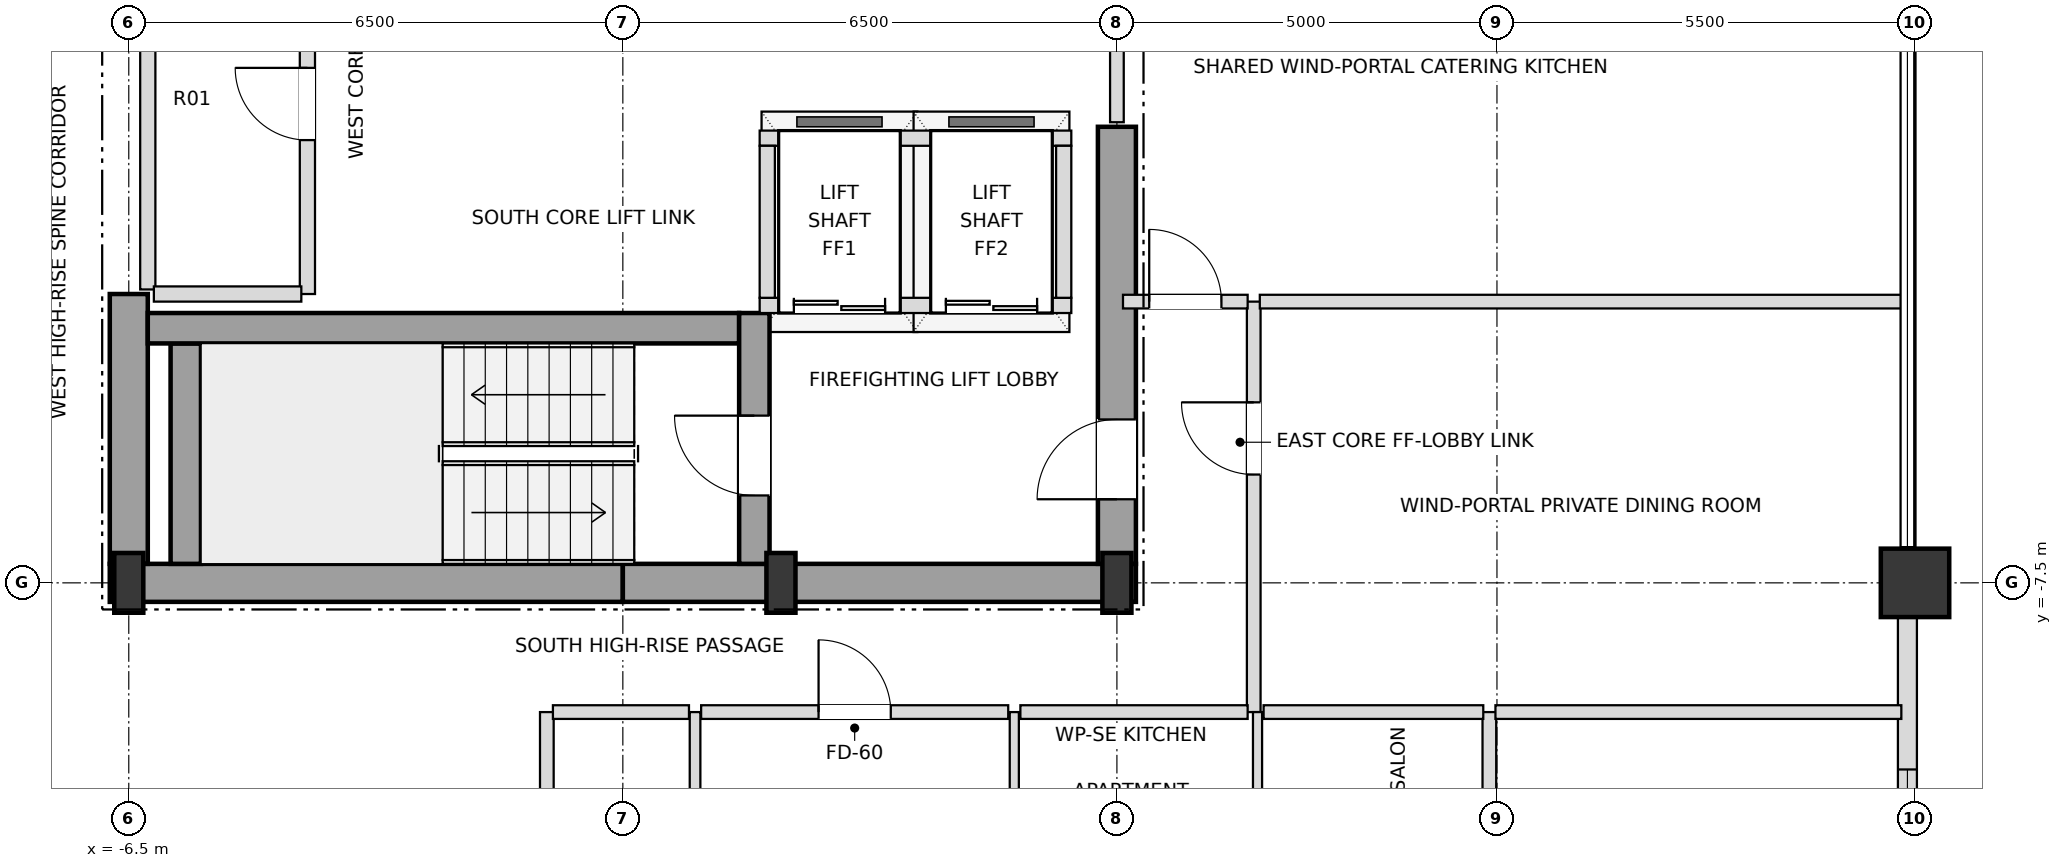
"""IFC4 building model, lengths in metres.
Left out: names, types, materials, properties, quantities, classifications, styles, units other than length and angle.
Written with IfcOpenShell. Run it as: python <this file> out.ifc"""

import sys

from ifc_helpers import new_model, si_unit, direction, frame, frame_2d, origin, origin_2d, place, context, subcontext, project, spatial, rectangle, i_section, extrude, element, fill, save


model = new_model("IFC4")
c1 = context("Model", 3, precision=1e-05, world=origin(), true_north=direction((0.0, 1.0)))
c2 = subcontext(c1, "Body", "Model", "MODEL_VIEW")
j1 = project(units=[si_unit("LENGTHUNIT", "METRE"), si_unit("PLANEANGLEUNIT", "RADIAN")], contexts=[c1])
p1 = place(None, origin())
s1 = spatial("IfcSite", under=j1, at=p1, CompositionType="ELEMENT")
p2 = place(p1, origin())
s2 = spatial("IfcBuilding", under=s1, at=p2, CompositionType="ELEMENT")
p3 = place(p2, frame((0.0, 0.0, 261.9)))
s3 = spatial("IfcBuildingStorey", under=s2, at=p3, CompositionType="ELEMENT", Elevation=261.9)
for number, where, z_axis, x_axis in (
    (1, (-6.5, -7.5, 0.0), (0.0, 0.0, 1.0), (1.0, 0.0, 0.0)),
    (2, (2.08, -7.5, 0.0), (0.0, 0.0, 1.0), (1.0, 0.0, 0.0)),
    (3, (6.5, -7.5, 0.0), (0.0, 0.0, 1.0), (1.0, 0.0, 0.0)),
):
    element("IfcColumn", number, at=place(p3, frame(where, z_axis=z_axis, x_axis=x_axis)), inside=s3, PredefinedType="COLUMN", context=c2, shape_type="SweptSolid", body=[
        extrude(i_section(OverallWidth=0.382, OverallDepth=0.786, WebThickness=0.02, FlangeThickness=0.033, at=origin_2d()), origin(), (0.0, 0.0, 1.0), 3.6),
    ])
p4 = place(p3, frame((17.0, -7.5, 0.0), z_axis=(0.0, 0.0, 1.0), x_axis=(1.0, 0.0, 0.0)))
e4 = element("IfcColumn", 4, at=p4, inside=s3, PredefinedType="USERDEFINED", context=c2, shape_type="SweptSolid", body=[
    extrude(rectangle(XDim=0.9, YDim=0.9, at=origin_2d()), origin(), (0.0, 0.0, 1.0), 3.6),
])
p5 = place(p3, frame((16.9, -12.555, 0.0), z_axis=(0.0, 0.0, 1.0), x_axis=(0.0, 1.0, 0.0)))
e5 = element("IfcWall", 5, at=p5, inside=s3, PredefinedType="SOLIDWALL", context=c2, shape_type="SweptSolid", body=[
    extrude(rectangle(XDim=4.61, YDim=0.25, at=frame_2d((2.305, 0.0))), origin(), (0.0, 0.0, 1.0), 2.748),
])
p6 = place(p5, frame((0.8, 0.0, 0.72)))
e6 = element("IfcOpeningElement", 6, at=p6, cuts=e5, PredefinedType="OPENING", context=c2, shape_type="SweptSolid", body=[
    extrude(rectangle(XDim=1.8, YDim=1.68, at=frame_2d((0.9, 0.84))), frame((0.0, 0.135, 0.0), z_axis=(0.0, -1.0, 0.0), x_axis=(1.0, 0.0, 0.0)), (0.0, 0.0, 1.0), 0.27),
])
for number, where, z_axis, x_axis in (
    (7, (-6.75, -7.5, 0.0), (0.0, 0.0, 1.0), (1.0, 0.0, 0.0)),
    (8, (0.0, -7.5, 0.0), (0.0, 0.0, 1.0), (1.0, 0.0, 0.0)),
):
    element("IfcWall", number, at=place(p3, frame(where, z_axis=z_axis, x_axis=x_axis)), inside=s3, PredefinedType="SHEAR", context=c2, shape_type="SweptSolid", body=[
        extrude(rectangle(XDim=6.75, YDim=0.5, at=frame_2d((3.375, 0.0))), origin(), (0.0, 0.0, 1.0), 3.38),
    ])
p7 = place(p3, frame((-6.5, -7.25, 0.0), z_axis=(0.0, 0.0, 1.0), x_axis=(0.0, 1.0, 0.0)))
e9 = element("IfcWall", 9, at=p7, inside=s3, PredefinedType="SHEAR", context=c2, shape_type="SweptSolid", body=[
    extrude(rectangle(XDim=3.55, YDim=0.5, at=frame_2d((1.775, 0.0))), origin(), (0.0, 0.0, 1.0), 3.38),
])
p8 = place(p3, frame((6.5, -7.25, 0.0), z_axis=(0.0, 0.0, 1.0), x_axis=(0.0, 1.0, 0.0)))
e10 = element("IfcWall", 10, at=p8, inside=s3, PredefinedType="SHEAR", context=c2, shape_type="SweptSolid", body=[
    extrude(rectangle(XDim=5.75, YDim=0.5, at=frame_2d((2.875, 0.0))), origin(), (0.0, 0.0, 1.0), 3.38),
])
p9 = place(p8, frame((0.85, 0.0, 0.0)))
e11 = element("IfcOpeningElement", 11, at=p9, cuts=e10, PredefinedType="OPENING", context=c2, shape_type="SweptSolid", body=[
    extrude(rectangle(XDim=1.05, YDim=2.15, at=frame_2d((0.525, 1.075))), frame((0.0, 0.26, 0.0), z_axis=(0.0, -1.0, 0.0), x_axis=(1.0, 0.0, 0.0)), (0.0, 0.0, 1.0), 0.52),
])
p10 = place(p3, frame((-5.75, -7.25, 0.0), z_axis=(0.0, 0.0, 1.0), x_axis=(0.0, 1.0, 0.0)))
e12 = element("IfcWall", 12, at=p10, inside=s3, PredefinedType="SHEAR", context=c2, shape_type="SweptSolid", body=[
    extrude(rectangle(XDim=2.9, YDim=0.4, at=frame_2d((1.45, 0.0))), origin(), (0.0, 0.0, 1.0), 3.38),
])
p11 = place(p3, frame((-6.25, -4.15, 0.0), z_axis=(0.0, 0.0, 1.0), x_axis=(1.0, 0.0, 0.0)))
e13 = element("IfcWall", 13, at=p11, inside=s3, PredefinedType="SHEAR", context=c2, shape_type="SweptSolid", body=[
    extrude(rectangle(XDim=7.78, YDim=0.4, at=frame_2d((3.89, 0.0))), origin(), (0.0, 0.0, 1.0), 3.38),
])
p12 = place(p3, frame((1.73, -7.25, 0.0), z_axis=(0.0, 0.0, 1.0), x_axis=(0.0, 1.0, 0.0)))
e14 = element("IfcWall", 14, at=p12, inside=s3, PredefinedType="SHEAR", context=c2, shape_type="SweptSolid", body=[
    extrude(rectangle(XDim=3.3, YDim=0.4, at=frame_2d((1.65, 0.0))), origin(), (0.0, 0.0, 1.0), 3.38),
])
p13 = place(p12, frame((0.9, 0.0, 0.0)))
e15 = element("IfcOpeningElement", 15, at=p13, cuts=e14, PredefinedType="OPENING", context=c2, shape_type="SweptSolid", body=[
    extrude(rectangle(XDim=1.05, YDim=2.15, at=frame_2d((0.525, 1.075))), frame((0.0, 0.21, 0.0), z_axis=(0.0, -1.0, 0.0), x_axis=(1.0, 0.0, 0.0)), (0.0, 0.0, 1.0), 0.42),
])
p14 = place(p3, frame((1.8, -3.85, 0.0), z_axis=(0.0, 0.0, 1.0), x_axis=(1.0, 0.0, 0.0)))
e16 = element("IfcWall", 16, at=p14, inside=s3, PredefinedType="SOLIDWALL", context=c2, shape_type="SweptSolid", body=[
    extrude(rectangle(XDim=4.1, YDim=0.2, at=frame_2d((2.05, 0.0))), origin(), (0.0, 0.0, 1.0), 3.38),
])
p15 = place(p14, frame((0.45, 0.0, 0.0)))
e17 = element("IfcOpeningElement", 17, at=p15, cuts=e16, PredefinedType="OPENING", context=c2, shape_type="SweptSolid", body=[
    extrude(rectangle(XDim=1.2, YDim=2.2, at=frame_2d((0.6, 1.1))), frame((0.0, 0.11, 0.0), z_axis=(0.0, -1.0, 0.0), x_axis=(1.0, 0.0, 0.0)), (0.0, 0.0, 1.0), 0.22),
])
p16 = place(p14, frame((2.45, 0.0, 0.0)))
e18 = element("IfcOpeningElement", 18, at=p16, cuts=e16, PredefinedType="OPENING", context=c2, shape_type="SweptSolid", body=[
    extrude(rectangle(XDim=1.2, YDim=2.2, at=frame_2d((0.6, 1.1))), frame((0.0, 0.11, 0.0), z_axis=(0.0, -1.0, 0.0), x_axis=(1.0, 0.0, 0.0)), (0.0, 0.0, 1.0), 0.22),
])
p17 = place(p3, frame((1.8, -1.65, 0.0), z_axis=(0.0, 0.0, 1.0), x_axis=(1.0, 0.0, 0.0)))
e19 = element("IfcWall", 19, at=p17, inside=s3, PredefinedType="SOLIDWALL", context=c2, shape_type="SweptSolid", body=[
    extrude(rectangle(XDim=4.1, YDim=0.2, at=frame_2d((2.05, 0.0))), origin(), (0.0, 0.0, 1.0), 3.38),
])
for number, where, z_axis, x_axis in (
    (20, (1.9, -3.75, 0.0), (0.0, 0.0, 1.0), (0.0, 1.0, 0.0)),
    (21, (5.8, -3.75, 0.0), (0.0, 0.0, 1.0), (0.0, 1.0, 0.0)),
):
    element("IfcWall", number, at=place(p3, frame(where, z_axis=z_axis, x_axis=x_axis)), inside=s3, PredefinedType="SOLIDWALL", context=c2, shape_type="SweptSolid", body=[
        extrude(rectangle(XDim=2.0, YDim=0.2, at=frame_2d((1.0, 0.0))), origin(), (0.0, 0.0, 1.0), 3.38),
    ])
p18 = place(p3, frame((-6.25, -3.64, 0.0), z_axis=(0.0, 0.0, 1.0), x_axis=(0.0, 1.0, 0.0)))
e22 = element("IfcWall", 22, at=p18, inside=s3, PredefinedType="SOLIDWALL", context=c2, shape_type="SweptSolid", body=[
    extrude(rectangle(XDim=7.34, YDim=0.2, at=frame_2d((3.67, 0.0))), origin(), (0.0, 0.0, 1.0), 3.38),
])
p19 = place(p3, frame((-4.15, -3.7, 0.0), z_axis=(0.0, 0.0, 1.0), x_axis=(0.0, 1.0, 0.0)))
e23 = element("IfcWall", 23, at=p19, inside=s3, PredefinedType="SOLIDWALL", context=c2, shape_type="SweptSolid", body=[
    extrude(rectangle(XDim=7.4, YDim=0.2, at=frame_2d((3.7, 0.0))), origin(), (0.0, 0.0, 1.0), 3.38),
])
p20 = place(p19, frame((2.025, 0.0, 0.0)))
e24 = element("IfcOpeningElement", 24, at=p20, cuts=e23, PredefinedType="OPENING", context=c2, shape_type="SweptSolid", body=[
    extrude(rectangle(XDim=0.95, YDim=2.15, at=frame_2d((0.475, 1.075))), frame((0.0, 0.11, 0.0), z_axis=(0.0, -1.0, 0.0), x_axis=(1.0, 0.0, 0.0)), (0.0, 0.0, 1.0), 0.22),
])
p21 = place(p19, frame((5.775, 0.0, 0.0)))
e25 = element("IfcOpeningElement", 25, at=p21, cuts=e23, PredefinedType="OPENING", context=c2, shape_type="SweptSolid", body=[
    extrude(rectangle(XDim=0.95, YDim=2.15, at=frame_2d((0.475, 1.075))), frame((0.0, 0.11, 0.0), z_axis=(0.0, -1.0, 0.0), x_axis=(1.0, 0.0, 0.0)), (0.0, 0.0, 1.0), 0.22),
])
p22 = place(p3, frame((-1.0, -19.9, 0.0), z_axis=(0.0, 0.0, 1.0), x_axis=(0.0, 1.0, 0.0)))
e26 = element("IfcWall", 26, at=p22, inside=s3, PredefinedType="PARTITIONING", context=c2, shape_type="SweptSolid", body=[
    extrude(rectangle(XDim=10.7, YDim=0.18, at=frame_2d((5.35, 0.0))), origin(), (0.0, 0.0, 1.0), 3.018),
])
p23 = place(p3, frame((0.95, -13.9, 0.0), z_axis=(0.0, 0.0, 1.0), x_axis=(0.0, 1.0, 0.0)))
e27 = element("IfcWall", 27, at=p23, inside=s3, PredefinedType="PARTITIONING", context=c2, shape_type="SweptSolid", body=[
    extrude(rectangle(XDim=4.7, YDim=0.14, at=frame_2d((2.35, 0.0))), origin(), (0.0, 0.0, 1.0), 3.38),
])
p24 = place(p23, frame((1.9, 0.0, 0.0)))
e28 = element("IfcOpeningElement", 28, at=p24, cuts=e27, PredefinedType="OPENING", context=c2, shape_type="SweptSolid", body=[
    extrude(rectangle(XDim=0.9, YDim=2.1, at=frame_2d((0.45, 1.05))), frame((0.0, 0.08, 0.0), z_axis=(0.0, -1.0, 0.0), x_axis=(1.0, 0.0, 0.0)), (0.0, 0.0, 1.0), 0.16),
])
p25 = place(p3, frame((5.15, -13.9, 0.0), z_axis=(0.0, 0.0, 1.0), x_axis=(0.0, 1.0, 0.0)))
e29 = element("IfcWall", 29, at=p25, inside=s3, PredefinedType="PARTITIONING", context=c2, shape_type="SweptSolid", body=[
    extrude(rectangle(XDim=4.7, YDim=0.12, at=frame_2d((2.35, 0.0))), origin(), (0.0, 0.0, 1.0), 3.38),
])
p26 = place(p25, frame((1.875, 0.0, 0.0)))
e30 = element("IfcOpeningElement", 30, at=p26, cuts=e29, PredefinedType="OPENING", context=c2, shape_type="SweptSolid", body=[
    extrude(rectangle(XDim=0.95, YDim=2.1, at=frame_2d((0.475, 1.05))), frame((0.0, 0.07, 0.0), z_axis=(0.0, -1.0, 0.0), x_axis=(1.0, 0.0, 0.0)), (0.0, 0.0, 1.0), 0.14),
])
p27 = place(p3, frame((6.5, -1.44, 0.0), z_axis=(0.0, 0.0, 1.0), x_axis=(0.0, 1.0, 0.0)))
e31 = element("IfcWall", 31, at=p27, inside=s3, PredefinedType="PARTITIONING", context=c2, shape_type="SweptSolid", body=[
    extrude(rectangle(XDim=5.33, YDim=0.18, at=frame_2d((2.665, 0.0))), origin(), (0.0, 0.0, 1.0), 2.826),
])
p28 = place(p3, frame((8.3, -9.2, 0.0), z_axis=(0.0, 0.0, 1.0), x_axis=(0.0, 1.0, 0.0)))
e32 = element("IfcWall", 32, at=p28, inside=s3, PredefinedType="PARTITIONING", context=c2, shape_type="SweptSolid", body=[
    extrude(rectangle(XDim=5.4, YDim=0.18, at=frame_2d((2.7, 0.0))), origin(), (0.0, 0.0, 1.0), 2.826),
])
p29 = place(p28, frame((3.125, 0.0, 0.0)))
e33 = element("IfcOpeningElement", 33, at=p29, cuts=e32, PredefinedType="OPENING", context=c2, shape_type="SweptSolid", body=[
    extrude(rectangle(XDim=0.95, YDim=2.15, at=frame_2d((0.475, 1.075))), frame((0.0, 0.1, 0.0), z_axis=(0.0, -1.0, 0.0), x_axis=(1.0, 0.0, 0.0)), (0.0, 0.0, 1.0), 0.2),
])
p30 = place(p3, frame((8.35, -19.9, 0.0), z_axis=(0.0, 0.0, 1.0), x_axis=(0.0, 1.0, 0.0)))
e34 = element("IfcWall", 34, at=p30, inside=s3, PredefinedType="PARTITIONING", context=c2, shape_type="SweptSolid", body=[
    extrude(rectangle(XDim=10.7, YDim=0.12, at=frame_2d((5.35, 0.0))), origin(), (0.0, 0.0, 1.0), 2.826),
])
p31 = place(p30, frame((7.875, 0.0, 0.0)))
e35 = element("IfcOpeningElement", 35, at=p31, cuts=e34, PredefinedType="OPENING", context=c2, shape_type="SweptSolid", body=[
    extrude(rectangle(XDim=0.95, YDim=2.1, at=frame_2d((0.475, 1.05))), frame((0.0, 0.07, 0.0), z_axis=(0.0, -1.0, 0.0), x_axis=(1.0, 0.0, 0.0)), (0.0, 0.0, 1.0), 0.14),
])
p32 = place(p30, frame((2.55, 0.0, 0.0)))
e36 = element("IfcOpeningElement", 36, at=p32, cuts=e34, PredefinedType="OPENING", context=c2, shape_type="SweptSolid", body=[
    extrude(rectangle(XDim=0.9, YDim=2.1, at=frame_2d((0.45, 1.05))), frame((0.0, 0.07, 0.0), z_axis=(0.0, -1.0, 0.0), x_axis=(1.0, 0.0, 0.0)), (0.0, 0.0, 1.0), 0.14),
])
p33 = place(p3, frame((11.4, -14.27, 0.0), z_axis=(0.0, 0.0, 1.0), x_axis=(0.0, 1.0, 0.0)))
e37 = element("IfcWall", 37, at=p33, inside=s3, PredefinedType="PARTITIONING", context=c2, shape_type="SweptSolid", body=[
    extrude(rectangle(XDim=5.07, YDim=0.18, at=frame_2d((2.535, 0.0))), origin(), (0.0, 0.0, 1.0), 2.748),
])
p34 = place(p3, frame((-0.92, -9.2, 0.0), z_axis=(0.0, 0.0, 1.0), x_axis=(1.0, 0.0, 0.0)))
e38 = element("IfcWall", 38, at=p34, inside=s3, PredefinedType="PARTITIONING", context=c2, shape_type="SweptSolid", body=[
    extrude(rectangle(XDim=1.79, YDim=0.18, at=frame_2d((0.895, 0.0))), origin(), (0.0, 0.0, 1.0), 3.38),
])
p35 = place(p3, frame((1.03, -9.2, 0.0), z_axis=(0.0, 0.0, 1.0), x_axis=(1.0, 0.0, 0.0)))
e39 = element("IfcWall", 39, at=p35, inside=s3, PredefinedType="PARTITIONING", context=c2, shape_type="SweptSolid", body=[
    extrude(rectangle(XDim=4.04, YDim=0.18, at=frame_2d((2.02, 0.0))), origin(), (0.0, 0.0, 1.0), 3.38),
])
p36 = place(p35, frame((1.545, 0.0, 0.0)))
e40 = element("IfcOpeningElement", 40, at=p36, cuts=e39, PredefinedType="OPENING", context=c2, shape_type="SweptSolid", body=[
    extrude(rectangle(XDim=0.95, YDim=2.15, at=frame_2d((0.475, 1.075))), frame((0.0, 0.1, 0.0), z_axis=(0.0, -1.0, 0.0), x_axis=(1.0, 0.0, 0.0)), (0.0, 0.0, 1.0), 0.2),
])
p37 = place(p3, frame((5.23, -9.2, 0.0), z_axis=(0.0, 0.0, 1.0), x_axis=(1.0, 0.0, 0.0)))
e41 = element("IfcWall", 41, at=p37, inside=s3, PredefinedType="PARTITIONING", context=c2, shape_type="SweptSolid", body=[
    extrude(rectangle(XDim=2.99, YDim=0.18, at=frame_2d((1.495, 0.0))), origin(), (0.0, 0.0, 1.0), 2.826),
])
p38 = place(p3, frame((8.43, -9.2, 0.0), z_axis=(0.0, 0.0, 1.0), x_axis=(1.0, 0.0, 0.0)))
e42 = element("IfcWall", 42, at=p38, inside=s3, PredefinedType="PARTITIONING", context=c2, shape_type="SweptSolid", body=[
    extrude(rectangle(XDim=2.89, YDim=0.18, at=frame_2d((1.445, 0.0))), origin(), (0.0, 0.0, 1.0), 3.38),
])
p39 = place(p3, frame((11.48, -9.2, 0.0), z_axis=(0.0, 0.0, 1.0), x_axis=(1.0, 0.0, 0.0)))
e43 = element("IfcWall", 43, at=p39, inside=s3, PredefinedType="PARTITIONING", context=c2, shape_type="SweptSolid", body=[
    extrude(rectangle(XDim=5.34, YDim=0.18, at=frame_2d((2.67, 0.0))), origin(), (0.0, 0.0, 1.0), 3.38),
])
p40 = place(p3, frame((6.58, -3.8, 0.0), z_axis=(0.0, 0.0, 1.0), x_axis=(1.0, 0.0, 0.0)))
e44 = element("IfcWall", 44, at=p40, inside=s3, PredefinedType="PARTITIONING", context=c2, shape_type="SweptSolid", body=[
    extrude(rectangle(XDim=1.64, YDim=0.18, at=frame_2d((0.82, 0.0))), origin(), (0.0, 0.0, 1.0), 3.38),
])
p41 = place(p40, frame((0.345, 0.0, 0.0)))
e45 = element("IfcOpeningElement", 45, at=p41, cuts=e44, PredefinedType="OPENING", context=c2, shape_type="SweptSolid", body=[
    extrude(rectangle(XDim=0.95, YDim=2.15, at=frame_2d((0.475, 1.075))), frame((0.0, 0.1, 0.0), z_axis=(0.0, -1.0, 0.0), x_axis=(1.0, 0.0, 0.0)), (0.0, 0.0, 1.0), 0.2),
])
p42 = place(p3, frame((8.38, -3.8, 0.0), z_axis=(0.0, 0.0, 1.0), x_axis=(1.0, 0.0, 0.0)))
e46 = element("IfcWall", 46, at=p42, inside=s3, PredefinedType="PARTITIONING", context=c2, shape_type="SweptSolid", body=[
    extrude(rectangle(XDim=8.44, YDim=0.18, at=frame_2d((4.22, 0.0))), origin(), (0.0, 0.0, 1.0), 3.018),
])
p43 = place(p3, frame((-6.17, -3.7, 0.0), z_axis=(0.0, 0.0, 1.0), x_axis=(1.0, 0.0, 0.0)))
e47 = element("IfcWall", 47, at=p43, inside=s3, PredefinedType="SOLIDWALL", context=c2, shape_type="SweptSolid", body=[
    extrude(rectangle(XDim=1.94, YDim=0.2, at=frame_2d((0.97, 0.0))), origin(), (0.0, 0.0, 1.0), 3.38),
])
p44 = place(p6, origin())
e48 = element("IfcWindow", 48, at=p44, inside=s3, PartitioningType="SINGLE_PANEL", PredefinedType="WINDOW", context=c2, shape_type="SweptSolid", body=[
    extrude(rectangle(XDim=1.8, YDim=1.68, at=frame_2d((0.9, 0.84))), frame((0.0, 0.03, 0.0), z_axis=(0.0, -1.0, 0.0), x_axis=(1.0, 0.0, 0.0)), (0.0, 0.0, 1.0), 0.06),
])
fill(e6, e48)
p45 = place(p9, origin())
e49 = element("IfcDoor", 49, at=p45, inside=s3, OperationType="SINGLE_SWING_LEFT", PredefinedType="DOOR", context=c2, shape_type="SweptSolid", body=[
    extrude(rectangle(XDim=1.05, YDim=2.15, at=frame_2d((0.525, 1.075))), frame((0.0, 0.025, 0.0), z_axis=(0.0, -1.0, 0.0), x_axis=(1.0, 0.0, 0.0)), (0.0, 0.0, 1.0), 0.05),
])
fill(e11, e49)
p46 = place(p13, origin())
e50 = element("IfcDoor", 50, at=p46, inside=s3, OperationType="SINGLE_SWING_RIGHT", PredefinedType="DOOR", context=c2, shape_type="SweptSolid", body=[
    extrude(rectangle(XDim=1.05, YDim=2.15, at=frame_2d((0.525, 1.075))), frame((0.0, 0.025, 0.0), z_axis=(0.0, -1.0, 0.0), x_axis=(1.0, 0.0, 0.0)), (0.0, 0.0, 1.0), 0.05),
])
fill(e15, e50)
p47 = place(p15, origin())
e51 = element("IfcDoor", 51, at=p47, inside=s3, OperationType="DOUBLE_DOOR_SLIDING", PredefinedType="DOOR", context=c2, shape_type="SweptSolid", body=[
    extrude(rectangle(XDim=1.2, YDim=2.2, at=frame_2d((0.6, 1.1))), frame((0.0, 0.025, 0.0), z_axis=(0.0, -1.0, 0.0), x_axis=(1.0, 0.0, 0.0)), (0.0, 0.0, 1.0), 0.05),
])
fill(e17, e51)
p48 = place(p16, origin())
e52 = element("IfcDoor", 52, at=p48, inside=s3, OperationType="DOUBLE_DOOR_SLIDING", PredefinedType="DOOR", context=c2, shape_type="SweptSolid", body=[
    extrude(rectangle(XDim=1.2, YDim=2.2, at=frame_2d((0.6, 1.1))), frame((0.0, 0.025, 0.0), z_axis=(0.0, -1.0, 0.0), x_axis=(1.0, 0.0, 0.0)), (0.0, 0.0, 1.0), 0.05),
])
fill(e18, e52)
p49 = place(p20, origin())
e53 = element("IfcDoor", 53, at=p49, inside=s3, OperationType="SINGLE_SWING_RIGHT", PredefinedType="DOOR", context=c2, shape_type="SweptSolid", body=[
    extrude(rectangle(XDim=0.95, YDim=2.15, at=frame_2d((0.475, 1.075))), frame((0.0, 0.025, 0.0), z_axis=(0.0, -1.0, 0.0), x_axis=(1.0, 0.0, 0.0)), (0.0, 0.0, 1.0), 0.05),
])
fill(e24, e53)
p50 = place(p36, origin())
e54 = element("IfcDoor", 54, at=p50, inside=s3, OperationType="SINGLE_SWING_LEFT", PredefinedType="DOOR", context=c2, shape_type="SweptSolid", body=[
    extrude(rectangle(XDim=0.95, YDim=2.15, at=frame_2d((0.475, 1.075))), frame((0.0, 0.025, 0.0), z_axis=(0.0, -1.0, 0.0), x_axis=(1.0, 0.0, 0.0)), (0.0, 0.0, 1.0), 0.05),
])
fill(e40, e54)
p51 = place(p29, origin())
e55 = element("IfcDoor", 55, at=p51, inside=s3, OperationType="SINGLE_SWING_RIGHT", PredefinedType="DOOR", context=c2, shape_type="SweptSolid", body=[
    extrude(rectangle(XDim=0.95, YDim=2.15, at=frame_2d((0.475, 1.075))), frame((0.0, 0.025, 0.0), z_axis=(0.0, -1.0, 0.0), x_axis=(1.0, 0.0, 0.0)), (0.0, 0.0, 1.0), 0.05),
])
fill(e33, e55)
p52 = place(p41, origin())
e56 = element("IfcDoor", 56, at=p52, inside=s3, OperationType="SINGLE_SWING_LEFT", PredefinedType="DOOR", context=c2, shape_type="SweptSolid", body=[
    extrude(rectangle(XDim=0.95, YDim=2.15, at=frame_2d((0.475, 1.075))), frame((0.0, 0.025, 0.0), z_axis=(0.0, -1.0, 0.0), x_axis=(1.0, 0.0, 0.0)), (0.0, 0.0, 1.0), 0.05),
])
fill(e45, e56)
save(model, sys.argv[1])
